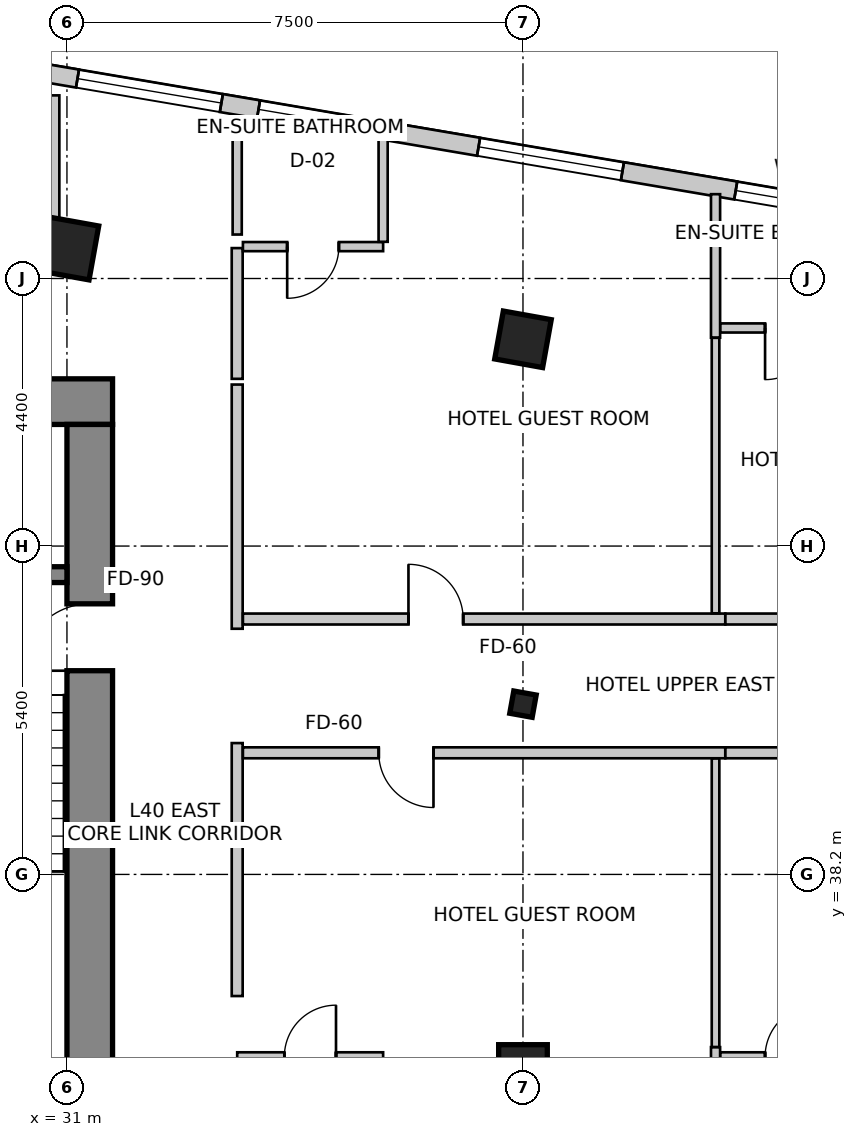
"""IFC4 building model, lengths in metres.
Left out: names, types, materials, properties, quantities, classifications, styles, units other than length and angle.
Written with IfcOpenShell. Run it as: python <this file> out.ifc"""

import sys

from ifc_helpers import new_model, si_unit, direction, frame, frame_2d, origin, origin_2d, place, context, subcontext, project, spatial, rectangle, i_section, extrude, source, transform, mapped, element, fill, save


model = new_model("IFC4")
c1 = context("Model", 3, precision=1e-05, world=origin(), true_north=direction((0.0, 1.0)))
c2 = subcontext(c1, "Body", "Model", "MODEL_VIEW")
j1 = project(units=[si_unit("LENGTHUNIT", "METRE"), si_unit("PLANEANGLEUNIT", "RADIAN")], contexts=[c1])
p1 = place(None, origin())
s1 = spatial("IfcSite", under=j1, at=p1, CompositionType="ELEMENT")
p2 = place(p1, origin())
s2 = spatial("IfcBuilding", under=s1, at=p2, CompositionType="ELEMENT")
p3 = place(p2, frame((0.0, 0.0, 161.0)))
s3 = spatial("IfcBuildingStorey", under=s2, at=p3, CompositionType="ELEMENT", Elevation=161.0)
p4 = place(p3, frame((15.85, 45.975, 0.0), z_axis=(0.0, 0.0, 1.0), x_axis=(1.0, 0.0, 0.0)))
e1 = element("IfcWall", 1, at=p4, inside=s3, PredefinedType="SHEAR", context=c2, shape_type="SweptSolid", body=[
    extrude(rectangle(XDim=15.9, YDim=0.75, at=frame_2d((7.95, 0.0))), origin(), (0.0, 0.0, 1.0), 3.6),
])
p5 = place(p3, frame((31.375, 34.2, 0.0), z_axis=(0.0, 0.0, 1.0), x_axis=(0.0, 1.0, 0.0)))
e2 = element("IfcWall", 2, at=p5, inside=s3, PredefinedType="SHEAR", context=c2, shape_type="SweptSolid", body=[
    extrude(rectangle(XDim=11.4, YDim=0.75, at=frame_2d((5.7, 0.0))), origin(), (0.0, 0.0, 1.0), 3.6),
])
m1 = source(origin(), c2, "Body", "SweptSolid", [
    extrude(rectangle(XDim=1.1, YDim=2.15, at=frame_2d((0.55, 1.075))), frame((0.0, 0.385, 0.0), z_axis=(0.0, -1.0, 0.0), x_axis=(1.0, 0.0, 0.0)), (0.0, 0.0, 1.0), 0.77),
])
p6 = place(p5, frame((7.35, 0.0, 0.0)))
e3 = element("IfcOpeningElement", 3, at=p6, cuts=e2, PredefinedType="OPENING", context=c2, shape_type="MappedRepresentation", body=[
    mapped(m1, transform((0.0, 0.0, 0.0), scale=1.0)),
])
p7 = place(p3, frame((27.5, 43.13, 0.0), z_axis=(0.0, 0.0, 1.0), x_axis=(1.0, 0.0, 0.0)))
e4 = element("IfcWall", 4, at=p7, inside=s3, PredefinedType="SHEAR", context=c2, shape_type="SweptSolid", body=[
    extrude(rectangle(XDim=3.5, YDim=0.26, at=frame_2d((1.75, 0.0))), origin(), (0.0, 0.0, 1.0), 3.6),
])
m2 = source(origin(), c2, "Body", "SweptSolid", [
    extrude(rectangle(XDim=0.9, YDim=0.9, at=origin_2d()), origin(), (0.0, 0.0, 1.0), 3.6),
])
p8 = place(p3, frame((31.0, 48.5, 0.0), z_axis=(0.0, 0.0, 1.0), x_axis=(0.984195607969, -0.17708474032, 0.0)))
e5 = element("IfcColumn", 5, at=p8, inside=s3, PredefinedType="COLUMN", context=c2, shape_type="MappedRepresentation", body=[
    mapped(m2, transform((0.0, 0.0, 0.0), scale=1.0)),
])
m3 = source(origin(), c2, "Body", "SweptSolid", [
    extrude(rectangle(XDim=0.8, YDim=0.8, at=origin_2d()), origin(), (0.0, 0.0, 1.0), 3.6),
])
for number, where, z_axis, x_axis in (
    (6, (38.5, 47.0, 0.0), (0.0, 0.0, 1.0), (0.984, -0.177, 0.0)),
    (7, (38.5, 35.0, 0.0), (0.0, 0.0, 1.0), (1.0, 0.0, 0.0)),
):
    element("IfcColumn", number, at=place(p3, frame(where, z_axis=z_axis, x_axis=x_axis)), inside=s3, PredefinedType="COLUMN", context=c2, shape_type="MappedRepresentation", body=[
        mapped(m3, transform((0.0, 0.0, 0.0), scale=1.0)),
    ])
m4 = source(origin(), c2, "Body", "SweptSolid", [
    extrude(i_section(OverallWidth=0.374, OverallDepth=0.372, WebThickness=0.016, FlangeThickness=0.026, FilletRadius=0.015, at=origin_2d()), origin(), (0.0, 0.0, 1.0), 3.6),
])
p9 = place(p3, frame((38.5, 41.0, 0.0), z_axis=(0.0, 0.0, 1.0), x_axis=(0.984195607969, -0.17708474032, 0.0)))
e8 = element("IfcColumn", 8, at=p9, inside=s3, PredefinedType="COLUMN", context=c2, shape_type="MappedRepresentation", body=[
    mapped(m4, transform((0.0, 0.0, 0.0), scale=1.0)),
])
p10 = place(p3, frame((53.561, 47.48, 0.0), z_axis=(0.0, 0.0, 1.0), x_axis=(-0.985845173895, 0.167658262868, 0.0)))
e9 = element("IfcWall", 9, at=p10, inside=s3, PredefinedType="SOLIDWALL", context=c2, shape_type="SweptSolid", body=[
    extrude(rectangle(XDim=32.132, YDim=0.3, at=frame_2d((16.066, 0.0))), origin(), (0.0, 0.0, 1.0), 3.35),
])
m5 = source(origin(), c2, "Body", "SweptSolid", [
    extrude(rectangle(XDim=2.4, YDim=2.2, at=frame_2d((1.2, 1.1))), frame((0.0, 0.16, 0.0), z_axis=(0.0, -1.0, 0.0), x_axis=(1.0, 0.0, 0.0)), (0.0, 0.0, 1.0), 0.32),
])
p11 = place(p10, frame((0.882, 0.0, 0.85)))
e10 = element("IfcOpeningElement", 10, at=p11, cuts=e9, PredefinedType="OPENING", context=c2, shape_type="MappedRepresentation", body=[
    mapped(m5, transform((0.0, 0.0, 0.0), scale=1.0)),
])
p12 = place(p10, frame((5.637, 0.0, 0.85)))
e11 = element("IfcOpeningElement", 11, at=p12, cuts=e9, PredefinedType="OPENING", context=c2, shape_type="MappedRepresentation", body=[
    mapped(m5, transform((0.0, 0.0, 0.0), scale=1.0)),
])
m6 = source(origin(), c2, "Body", "SweptSolid", [
    extrude(rectangle(XDim=1.8, YDim=2.1, at=frame_2d((0.9, 1.05))), frame((0.0, 0.16, 0.0), z_axis=(0.0, -1.0, 0.0), x_axis=(1.0, 0.0, 0.0)), (0.0, 0.0, 1.0), 0.32),
])
p13 = place(p10, frame((9.928, 0.0, 0.85)))
e12 = element("IfcOpeningElement", 12, at=p13, cuts=e9, PredefinedType="OPENING", context=c2, shape_type="MappedRepresentation", body=[
    mapped(m6, transform((0.0, 0.0, 0.0), scale=1.0)),
])
p14 = place(p10, frame((13.618, 0.0, 0.85)))
e13 = element("IfcOpeningElement", 13, at=p14, cuts=e9, PredefinedType="OPENING", context=c2, shape_type="MappedRepresentation", body=[
    mapped(m5, transform((0.0, 0.0, 0.0), scale=1.0)),
])
p15 = place(p10, frame((17.889, 0.0, 0.85)))
e14 = element("IfcOpeningElement", 14, at=p15, cuts=e9, PredefinedType="OPENING", context=c2, shape_type="MappedRepresentation", body=[
    mapped(m6, transform((0.0, 0.0, 0.0), scale=1.0)),
])
p16 = place(p10, frame((20.309, 0.0, 0.85)))
e15 = element("IfcOpeningElement", 15, at=p16, cuts=e9, PredefinedType="OPENING", context=c2, shape_type="MappedRepresentation", body=[
    mapped(m5, transform((0.0, 0.0, 0.0), scale=1.0)),
])
p17 = place(p10, frame((25.4, 0.0, 0.85)))
e16 = element("IfcOpeningElement", 16, at=p17, cuts=e9, PredefinedType="OPENING", context=c2, shape_type="MappedRepresentation", body=[
    mapped(m5, transform((0.0, 0.0, 0.0), scale=1.0)),
])
m7 = source(origin(), c2, "Body", "SweptSolid", [
    extrude(rectangle(XDim=1.2, YDim=1.6, at=frame_2d((0.6, 0.8))), frame((0.0, 0.16, 0.0), z_axis=(0.0, -1.0, 0.0), x_axis=(1.0, 0.0, 0.0)), (0.0, 0.0, 1.0), 0.32),
])
p18 = place(p10, frame((30.5, 0.0, 0.85)))
e17 = element("IfcOpeningElement", 17, at=p18, cuts=e9, PredefinedType="OPENING", context=c2, shape_type="MappedRepresentation", body=[
    mapped(m7, transform((0.0, 0.0, 0.0), scale=1.0)),
])
p19 = place(p3, frame((23.962, 48.5, 0.0), z_axis=(0.0, 0.0, 1.0), x_axis=(1.0, 0.0, 0.0)))
e18 = element("IfcWall", 18, at=p19, inside=s3, PredefinedType="PARTITIONING", context=c2, shape_type="SweptSolid", body=[
    extrude(rectangle(XDim=6.998, YDim=0.18, at=frame_2d((3.499, 0.0))), origin(), (0.0, 0.0, 1.0), 2.492),
])
m8 = source(origin(), c2, "Body", "SweptSolid", [
    extrude(rectangle(XDim=0.85, YDim=2.15, at=frame_2d((0.425, 1.075))), frame((0.0, 0.1, 0.0), z_axis=(0.0, -1.0, 0.0), x_axis=(1.0, 0.0, 0.0)), (0.0, 0.0, 1.0), 0.2),
])
p20 = place(p19, frame((3.074, 0.0, 0.0)))
e19 = element("IfcOpeningElement", 19, at=p20, cuts=e18, PredefinedType="OPENING", context=c2, shape_type="MappedRepresentation", body=[
    mapped(m8, transform((0.0, 0.0, 0.0), scale=1.0)),
])
p21 = place(p3, frame((33.8, 48.5, 0.0), z_axis=(0.0, 0.0, 1.0), x_axis=(0.0, -1.0, 0.0)))
e20 = element("IfcWall", 20, at=p21, inside=s3, PredefinedType="PARTITIONING", context=c2, shape_type="SweptSolid", body=[
    extrude(rectangle(XDim=2.15, YDim=0.18, at=frame_2d((1.075, 0.0))), origin(), (0.0, 0.0, 1.0), 2.492),
])
p22 = place(p3, frame((33.8, 46.256, 0.0), z_axis=(0.0, 0.0, 1.0), x_axis=(0.0, -1.0, 0.0)))
e21 = element("IfcWall", 21, at=p22, inside=s3, PredefinedType="PARTITIONING", context=c2, shape_type="SweptSolid", body=[
    extrude(rectangle(XDim=4.016, YDim=0.18, at=frame_2d((2.008, 0.0))), origin(), (0.0, 0.0, 1.0), 2.879),
])
p23 = place(p3, frame((33.8, 40.36, 0.0), z_axis=(0.0, 0.0, 1.0), x_axis=(0.0, -1.0, 0.0)))
e22 = element("IfcWall", 22, at=p23, inside=s3, PredefinedType="PARTITIONING", context=c2, shape_type="SweptSolid", body=[
    extrude(rectangle(XDim=4.16, YDim=0.18, at=frame_2d((2.08, 0.0))), origin(), (0.0, 0.0, 1.0), 3.35),
])
p24 = place(p3, frame((33.894, 42.4, 0.0), z_axis=(0.0, 0.0, 1.0), x_axis=(1.0, 0.0, 0.0)))
e23 = element("IfcWall", 23, at=p24, inside=s3, PredefinedType="PARTITIONING", context=c2, shape_type="SweptSolid", body=[
    extrude(rectangle(XDim=7.933, YDim=0.18, at=frame_2d((3.966, 0.0))), origin(), (0.0, 0.0, 1.0), 2.803),
])
m9 = source(origin(), c2, "Body", "SweptSolid", [
    extrude(rectangle(XDim=0.9, YDim=2.15, at=frame_2d((0.45, 1.075))), frame((0.0, 0.1, 0.0), z_axis=(0.0, -1.0, 0.0), x_axis=(1.0, 0.0, 0.0)), (0.0, 0.0, 1.0), 0.2),
])
p25 = place(p24, frame((2.723, 0.0, 0.0)))
e24 = element("IfcOpeningElement", 24, at=p25, cuts=e23, PredefinedType="OPENING", context=c2, shape_type="MappedRepresentation", body=[
    mapped(m9, transform((0.0, 0.0, 0.0), scale=1.0)),
])
p26 = place(p3, frame((41.827, 40.2, 0.0), z_axis=(0.0, 0.0, 1.0), x_axis=(-1.0, 0.0, 0.0)))
e25 = element("IfcWall", 25, at=p26, inside=s3, PredefinedType="PARTITIONING", context=c2, shape_type="SweptSolid", body=[
    extrude(rectangle(XDim=7.933, YDim=0.18, at=frame_2d((3.966, 0.0))), origin(), (0.0, 0.0, 1.0), 2.803),
])
p27 = place(p26, frame((4.799, 0.0, 0.0)))
e26 = element("IfcOpeningElement", 26, at=p27, cuts=e25, PredefinedType="OPENING", context=c2, shape_type="MappedRepresentation", body=[
    mapped(m9, transform((0.0, 0.0, 0.0), scale=1.0)),
])
p28 = place(p3, frame((41.829, 42.4, 0.0), z_axis=(0.0, 0.0, 1.0), x_axis=(1.0, 0.0, 0.0)))
e27 = element("IfcWall", 27, at=p28, inside=s3, PredefinedType="PARTITIONING", context=c2, shape_type="SweptSolid", body=[
    extrude(rectangle(XDim=7.706, YDim=0.18, at=frame_2d((3.853, 0.0))), origin(), (0.0, 0.0, 1.0), 2.803),
])
p29 = place(p28, frame((3.403, 0.0, 0.0)))
e28 = element("IfcOpeningElement", 28, at=p29, cuts=e27, PredefinedType="OPENING", context=c2, shape_type="MappedRepresentation", body=[
    mapped(m9, transform((0.0, 0.0, 0.0), scale=1.0)),
])
p30 = place(p3, frame((49.535, 40.2, 0.0), z_axis=(0.0, 0.0, 1.0), x_axis=(-1.0, 0.0, 0.0)))
e29 = element("IfcWall", 29, at=p30, inside=s3, PredefinedType="PARTITIONING", context=c2, shape_type="SweptSolid", body=[
    extrude(rectangle(XDim=7.706, YDim=0.18, at=frame_2d((3.853, 0.0))), origin(), (0.0, 0.0, 1.0), 2.803),
])
p31 = place(p30, frame((3.403, 0.0, 0.0)))
e30 = element("IfcOpeningElement", 30, at=p31, cuts=e29, PredefinedType="OPENING", context=c2, shape_type="MappedRepresentation", body=[
    mapped(m9, transform((0.0, 0.0, 0.0), scale=1.0)),
])
p32 = place(p3, frame((36.2, 48.524, 0.0), z_axis=(0.0, 0.0, 1.0), x_axis=(-1.0, 0.0, 0.0)))
e31 = element("IfcWall", 31, at=p32, inside=s3, PredefinedType="PARTITIONING", context=c2, shape_type="SweptSolid", body=[
    extrude(rectangle(XDim=2.306, YDim=0.15, at=frame_2d((1.153, 0.0))), origin(), (0.0, 0.0, 1.0), 3.35),
])
m10 = source(origin(), c2, "Body", "SweptSolid", [
    extrude(rectangle(XDim=0.85, YDim=2.15, at=frame_2d((0.425, 1.075))), frame((0.0, 0.085, 0.0), z_axis=(0.0, -1.0, 0.0), x_axis=(1.0, 0.0, 0.0)), (0.0, 0.0, 1.0), 0.17),
])
p33 = place(p32, frame((0.728, 0.0, 0.0)))
e32 = element("IfcOpeningElement", 32, at=p33, cuts=e31, PredefinedType="OPENING", context=c2, shape_type="MappedRepresentation", body=[
    mapped(m10, transform((0.0, 0.0, 0.0), scale=1.0)),
])
p34 = place(p3, frame((36.2, 50.316, 0.0), z_axis=(0.0, 0.0, 1.0), x_axis=(0.0, -1.0, 0.0)))
e33 = element("IfcWall", 33, at=p34, inside=s3, PredefinedType="PARTITIONING", context=c2, shape_type="SweptSolid", body=[
    extrude(rectangle(XDim=1.713, YDim=0.15, at=frame_2d((0.856, 0.0))), origin(), (0.0, 0.0, 1.0), 3.35),
])
p35 = place(p3, frame((41.667, 49.387, 0.0), z_axis=(0.0, 0.0, 1.0), x_axis=(0.0, -1.0, 0.0)))
e34 = element("IfcWall", 34, at=p35, inside=s3, PredefinedType="PARTITIONING", context=c2, shape_type="SweptSolid", body=[
    extrude(rectangle(XDim=2.36, YDim=0.15, at=frame_2d((1.18, 0.0))), origin(), (0.0, 0.0, 1.0), 3.35),
])
p36 = place(p3, frame((41.667, 47.025, 0.0), z_axis=(0.0, 0.0, 1.0), x_axis=(0.0, -1.0, 0.0)))
e35 = element("IfcWall", 35, at=p36, inside=s3, PredefinedType="PARTITIONING", context=c2, shape_type="SweptSolid", body=[
    extrude(rectangle(XDim=4.531, YDim=0.125, at=frame_2d((2.265, 0.0))), origin(), (0.0, 0.0, 1.0), 2.492),
])
p37 = place(p3, frame((33.8, 35.2, 0.0), z_axis=(0.0, 0.0, 1.0), x_axis=(1.0, 0.0, 0.0)))
e36 = element("IfcWall", 36, at=p37, inside=s3, PredefinedType="PARTITIONING", context=c2, shape_type="SweptSolid", body=[
    extrude(rectangle(XDim=2.4, YDim=0.15, at=frame_2d((1.2, 0.0))), origin(), (0.0, 0.0, 1.0), 3.35),
])
p38 = place(p37, frame((0.775, 0.0, 0.0)))
e37 = element("IfcOpeningElement", 37, at=p38, cuts=e36, PredefinedType="OPENING", context=c2, shape_type="MappedRepresentation", body=[
    mapped(m10, transform((0.0, 0.0, 0.0), scale=1.0)),
])
p39 = place(p3, frame((41.667, 35.36, 0.0), z_axis=(0.0, 0.0, 1.0), x_axis=(0.0, -1.0, 0.0)))
e38 = element("IfcWall", 38, at=p39, inside=s3, PredefinedType="PARTITIONING", context=c2, shape_type="SweptSolid", body=[
    extrude(rectangle(XDim=2.36, YDim=0.15, at=frame_2d((1.18, 0.0))), origin(), (0.0, 0.0, 1.0), 2.492),
])
p40 = place(p3, frame((41.667, 40.106, 0.0), z_axis=(0.0, 0.0, 1.0), x_axis=(0.0, -1.0, 0.0)))
e39 = element("IfcWall", 39, at=p40, inside=s3, PredefinedType="PARTITIONING", context=c2, shape_type="SweptSolid", body=[
    extrude(rectangle(XDim=4.744, YDim=0.125, at=frame_2d((2.372, 0.0))), origin(), (0.0, 0.0, 1.0), 2.879),
])
p41 = place(p3, frame((44.067, 47.187, 0.0), z_axis=(0.0, 0.0, 1.0), x_axis=(-1.0, 0.0, 0.0)))
e40 = element("IfcWall", 40, at=p41, inside=s3, PredefinedType="PARTITIONING", context=c2, shape_type="SweptSolid", body=[
    extrude(rectangle(XDim=2.321, YDim=0.15, at=frame_2d((1.16, 0.0))), origin(), (0.0, 0.0, 1.0), 3.35),
])
p42 = place(p41, frame((0.736, 0.0, 0.0)))
e41 = element("IfcOpeningElement", 41, at=p42, cuts=e40, PredefinedType="OPENING", context=c2, shape_type="MappedRepresentation", body=[
    mapped(m10, transform((0.0, 0.0, 0.0), scale=1.0)),
])
p43 = place(p3, frame((41.746, 35.2, 0.0), z_axis=(0.0, 0.0, 1.0), x_axis=(1.0, 0.0, 0.0)))
e42 = element("IfcWall", 42, at=p43, inside=s3, PredefinedType="PARTITIONING", context=c2, shape_type="SweptSolid", body=[
    extrude(rectangle(XDim=2.321, YDim=0.15, at=frame_2d((1.16, 0.0))), origin(), (0.0, 0.0, 1.0), 2.492),
])
p44 = place(p43, frame((0.736, 0.0, 0.0)))
e43 = element("IfcOpeningElement", 43, at=p44, cuts=e42, PredefinedType="OPENING", context=c2, shape_type="MappedRepresentation", body=[
    mapped(m10, transform((0.0, 0.0, 0.0), scale=1.0)),
])
p45 = place(p3, frame((30.8, 51.011, 0.0), z_axis=(0.0, 0.0, 1.0), x_axis=(0.0, -1.0, 0.0)))
e44 = element("IfcWall", 44, at=p45, inside=s3, PredefinedType="PARTITIONING", context=c2, shape_type="SweptSolid", body=[
    extrude(rectangle(XDim=2.292, YDim=0.15, at=frame_2d((1.146, 0.0))), origin(), (0.0, 0.0, 1.0), 3.35),
])
p46 = place(p3, frame((33.8, 48.723, 0.0), z_axis=(0.0, 0.0, 1.0), x_axis=(0.0, 1.0, 0.0)))
e45 = element("IfcWall", 45, at=p46, inside=s3, PredefinedType="PARTITIONING", context=c2, shape_type="SweptSolid", body=[
    extrude(rectangle(XDim=1.778, YDim=0.15, at=frame_2d((0.889, 0.0))), origin(), (0.0, 0.0, 1.0), 3.35),
])
m11 = source(origin(), c2, "Body", "SweptSolid", [
    extrude(rectangle(XDim=1.8, YDim=2.1, at=frame_2d((0.9, 1.05))), frame((0.0, -0.015, 0.0), z_axis=(0.0, -1.0, 0.0), x_axis=(1.0, 0.0, 0.0)), (0.0, 0.0, 1.0), 0.06),
])
p47 = place(p13, origin())
e46 = element("IfcWindow", 46, at=p47, inside=s3, PartitioningType="SINGLE_PANEL", PredefinedType="WINDOW", context=c2, shape_type="MappedRepresentation", body=[
    mapped(m11, transform((0.0, 0.0, 0.0), scale=1.0)),
])
fill(e12, e46)
m12 = source(origin(), c2, "Body", "SweptSolid", [
    extrude(rectangle(XDim=2.4, YDim=2.2, at=frame_2d((1.2, 1.1))), frame((0.0, -0.015, 0.0), z_axis=(0.0, -1.0, 0.0), x_axis=(1.0, 0.0, 0.0)), (0.0, 0.0, 1.0), 0.06),
])
p48 = place(p14, origin())
e47 = element("IfcWindow", 47, at=p48, inside=s3, PartitioningType="SINGLE_PANEL", PredefinedType="WINDOW", context=c2, shape_type="MappedRepresentation", body=[
    mapped(m12, transform((0.0, 0.0, 0.0), scale=1.0)),
])
fill(e13, e47)
p49 = place(p15, origin())
e48 = element("IfcWindow", 48, at=p49, inside=s3, PartitioningType="SINGLE_PANEL", PredefinedType="WINDOW", context=c2, shape_type="MappedRepresentation", body=[
    mapped(m11, transform((0.0, 0.0, 0.0), scale=1.0)),
])
fill(e14, e48)
p50 = place(p16, origin())
e49 = element("IfcWindow", 49, at=p50, inside=s3, PartitioningType="SINGLE_PANEL", PredefinedType="WINDOW", context=c2, shape_type="MappedRepresentation", body=[
    mapped(m12, transform((0.0, 0.0, 0.0), scale=1.0)),
])
fill(e15, e49)
m13 = source(origin(), c2, "Body", "SweptSolid", [
    extrude(rectangle(XDim=1.1, YDim=2.15, at=frame_2d((0.55, 1.075))), frame((0.0, 0.025, 0.0), z_axis=(0.0, -1.0, 0.0), x_axis=(1.0, 0.0, 0.0)), (0.0, 0.0, 1.0), 0.05),
])
p51 = place(p6, origin())
e50 = element("IfcDoor", 50, at=p51, inside=s3, OperationType="SINGLE_SWING_LEFT", PredefinedType="DOOR", context=c2, shape_type="MappedRepresentation", body=[
    mapped(m13, transform((0.0, 0.0, 0.0), scale=1.0)),
])
fill(e3, e50)
m14 = source(origin(), c2, "Body", "SweptSolid", [
    extrude(rectangle(XDim=0.85, YDim=2.15, at=frame_2d((0.425, 1.075))), frame((0.0, 0.025, 0.0), z_axis=(0.0, -1.0, 0.0), x_axis=(1.0, 0.0, 0.0)), (0.0, 0.0, 1.0), 0.05),
])
p52 = place(p33, origin())
e51 = element("IfcDoor", 51, at=p52, inside=s3, OperationType="SINGLE_SWING_RIGHT", PredefinedType="DOOR", context=c2, shape_type="MappedRepresentation", body=[
    mapped(m14, transform((0.0, 0.0, 0.0), scale=1.0)),
])
fill(e32, e51)
m15 = source(origin(), c2, "Body", "SweptSolid", [
    extrude(rectangle(XDim=0.9, YDim=2.15, at=frame_2d((0.45, 1.075))), frame((0.0, 0.025, 0.0), z_axis=(0.0, -1.0, 0.0), x_axis=(1.0, 0.0, 0.0)), (0.0, 0.0, 1.0), 0.05),
])
p53 = place(p25, origin())
e52 = element("IfcDoor", 52, at=p53, inside=s3, OperationType="SINGLE_SWING_LEFT", PredefinedType="DOOR", context=c2, shape_type="MappedRepresentation", body=[
    mapped(m15, transform((0.0, 0.0, 0.0), scale=1.0)),
])
fill(e24, e52)
p54 = place(p38, origin())
e53 = element("IfcDoor", 53, at=p54, inside=s3, OperationType="SINGLE_SWING_RIGHT", PredefinedType="DOOR", context=c2, shape_type="MappedRepresentation", body=[
    mapped(m14, transform((0.0, 0.0, 0.0), scale=1.0)),
])
fill(e37, e53)
p55 = place(p27, origin())
e54 = element("IfcDoor", 54, at=p55, inside=s3, OperationType="SINGLE_SWING_LEFT", PredefinedType="DOOR", context=c2, shape_type="MappedRepresentation", body=[
    mapped(m15, transform((0.0, 0.0, 0.0), scale=1.0)),
])
fill(e26, e54)
p56 = place(p42, origin())
e55 = element("IfcDoor", 55, at=p56, inside=s3, OperationType="SINGLE_SWING_RIGHT", PredefinedType="DOOR", context=c2, shape_type="MappedRepresentation", body=[
    mapped(m14, transform((0.0, 0.0, 0.0), scale=1.0)),
])
fill(e41, e55)
p57 = place(p44, origin())
e56 = element("IfcDoor", 56, at=p57, inside=s3, OperationType="SINGLE_SWING_RIGHT", PredefinedType="DOOR", context=c2, shape_type="MappedRepresentation", body=[
    mapped(m14, transform((0.0, 0.0, 0.0), scale=1.0)),
])
fill(e43, e56)
save(model, sys.argv[1])
